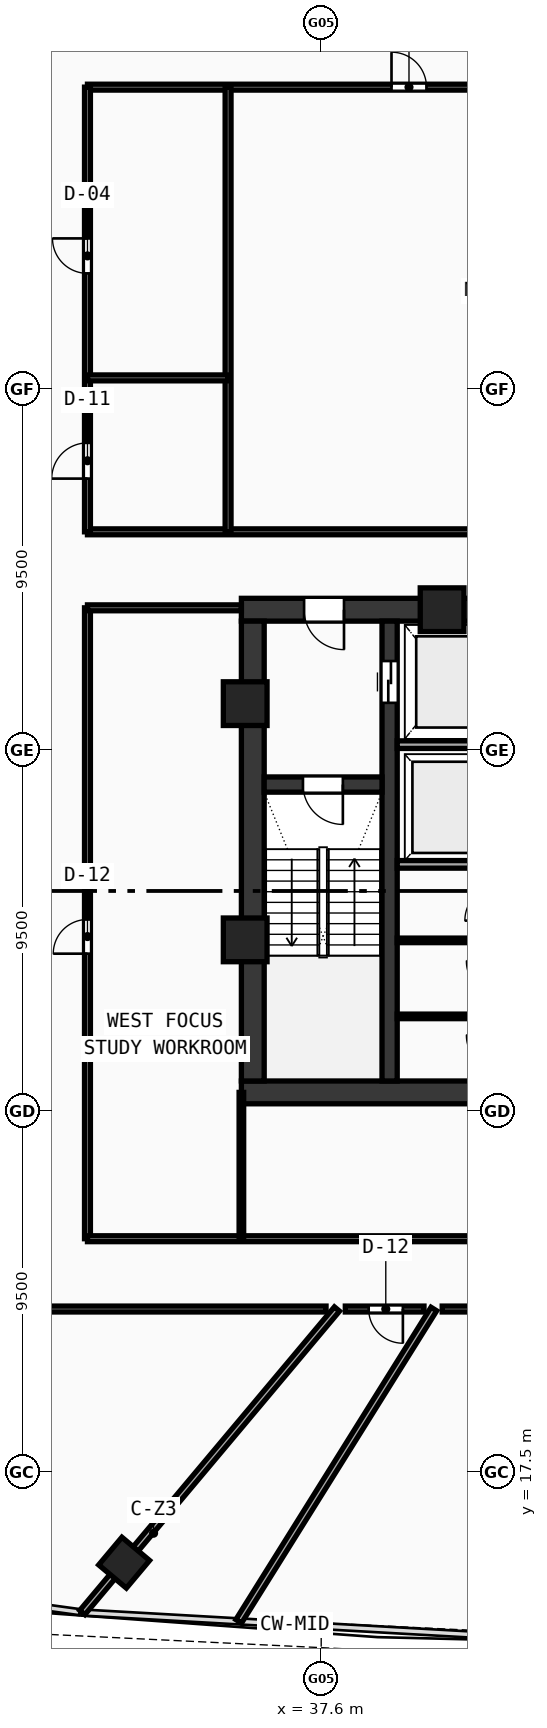
"""IFC4 building model, lengths in metres.
Left out: names, types, materials, properties, quantities, classifications, styles, units other than length and angle.
Written with IfcOpenShell. Run it as: python <this file> out.ifc"""

import sys

from ifc_helpers import new_model, si_unit, direction, frame, frame_2d, origin, origin_with_axes, origin_2d, place, context, subcontext, project, spatial, rectangle, hollow_rectangle, extrude, source, transform, mapped, element, fill, save


model = new_model("IFC4")
c1 = context("Model", 3, precision=1e-05, world=origin(), true_north=direction((0.0, 1.0)))
c2 = subcontext(c1, "Body", "Model", "MODEL_VIEW")
j1 = project(units=[si_unit("LENGTHUNIT", "METRE"), si_unit("PLANEANGLEUNIT", "RADIAN")], contexts=[c1])
p1 = place(None, origin())
s1 = spatial("IfcSite", under=j1, at=p1, CompositionType="ELEMENT")
p2 = place(p1, origin())
s2 = spatial("IfcBuilding", under=s1, at=p2, CompositionType="ELEMENT")
p3 = place(p2, frame((0.0, 0.0, 148.23)))
s3 = spatial("IfcBuildingStorey", under=s2, at=p3, CompositionType="ELEMENT", Elevation=148.23)
p4 = place(p3, frame((35.5, 27.5, 0.0), z_axis=(0.0, 0.0, 1.0), x_axis=(1.0, 0.0, 0.0)))
e1 = element("IfcWall", 1, at=p4, inside=s3, PredefinedType="SHEAR", context=c2, shape_type="SweptSolid", body=[
    extrude(rectangle(XDim=25.0, YDim=0.6, at=frame_2d((12.5, 0.0))), origin(), (0.0, 0.0, 1.0), 3.42),
])
p5 = place(p3, frame((35.5, 40.2, 0.0), z_axis=(0.0, 0.0, 1.0), x_axis=(1.0, 0.0, 0.0)))
e2 = element("IfcWall", 2, at=p5, inside=s3, PredefinedType="SHEAR", context=c2, shape_type="SweptSolid", body=[
    extrude(rectangle(XDim=11.3, YDim=0.6, at=frame_2d((5.65, 0.0))), origin(), (0.0, 0.0, 1.0), 3.42),
])
p6 = place(p5, frame((1.65, 0.0, 0.0)))
e3 = element("IfcOpeningElement", 3, at=p6, cuts=e2, PredefinedType="OPENING", context=c2, shape_type="SweptSolid", body=[
    extrude(rectangle(XDim=1.05, YDim=2.1, at=frame_2d((0.525, 1.05))), frame((0.0, 0.31, 0.0), z_axis=(0.0, -1.0, 0.0), x_axis=(1.0, 0.0, 0.0)), (0.0, 0.0, 1.0), 0.62),
])
p7 = place(p3, frame((35.8, 27.8, 0.0), z_axis=(0.0, 0.0, 1.0), x_axis=(0.0, 1.0, 0.0)))
e4 = element("IfcWall", 4, at=p7, inside=s3, PredefinedType="SHEAR", context=c2, shape_type="SweptSolid", body=[
    extrude(rectangle(XDim=12.1, YDim=0.6, at=frame_2d((6.05, 0.0))), origin(), (0.0, 0.0, 1.0), 3.42),
])
p8 = place(p3, frame((39.4, 27.8, 0.0), z_axis=(0.0, 0.0, 1.0), x_axis=(0.0, 1.0, 0.0)))
e5 = element("IfcWall", 5, at=p8, inside=s3, PredefinedType="SHEAR", context=c2, shape_type="SweptSolid", body=[
    extrude(rectangle(XDim=12.1, YDim=0.4, at=frame_2d((6.05, 0.0))), origin(), (0.0, 0.0, 1.0), 3.42),
])
p9 = place(p8, frame((9.95, 0.0, 0.0)))
e6 = element("IfcOpeningElement", 6, at=p9, cuts=e5, PredefinedType="OPENING", context=c2, shape_type="SweptSolid", body=[
    extrude(rectangle(XDim=1.1, YDim=2.1, at=frame_2d((0.55, 1.05))), frame((0.0, 0.21, 0.0), z_axis=(0.0, -1.0, 0.0), x_axis=(1.0, 0.0, 0.0)), (0.0, 0.0, 1.0), 0.42),
])
p10 = place(p3, frame((36.1, 35.6, 0.0), z_axis=(0.0, 0.0, 1.0), x_axis=(1.0, 0.0, 0.0)))
e7 = element("IfcWall", 7, at=p10, inside=s3, PredefinedType="SHEAR", context=c2, shape_type="SweptSolid", body=[
    extrude(rectangle(XDim=3.1, YDim=0.4, at=frame_2d((1.55, 0.0))), origin(), (0.0, 0.0, 1.0), 3.42),
])
p11 = place(p10, frame((1.02, 0.0, 0.0)))
e8 = element("IfcOpeningElement", 8, at=p11, cuts=e7, PredefinedType="OPENING", context=c2, shape_type="SweptSolid", body=[
    extrude(rectangle(XDim=1.05, YDim=2.1, at=frame_2d((0.525, 1.05))), frame((0.0, 0.21, 0.0), z_axis=(0.0, -1.0, 0.0), x_axis=(1.0, 0.0, 0.0)), (0.0, 0.0, 1.0), 0.42),
])
m1 = source(origin(), c2, "Body", "SweptSolid", [
    extrude(hollow_rectangle(XDim=1.15, YDim=1.15, WallThickness=0.048, at=origin_2d()), origin(), (0.0, 0.0, 1.0), 3.68),
])
for number, where, z_axis, x_axis in (
    (9, (40.781, 40.2, -0.26), (0.0, 0.0, 1.0), (1.0, 0.0, 0.0)),
    (10, (35.6, 37.729, -0.26), (0.0, 0.0, 1.0), (1.0, 0.0, 0.0)),
    (11, (35.6, 31.513, -0.26), (0.0, 0.0, 1.0), (1.0, 0.0, 0.0)),
):
    element("IfcColumn", number, at=place(p3, frame(where, z_axis=z_axis, x_axis=x_axis)), inside=s3, PredefinedType="COLUMN", context=c2, shape_type="MappedRepresentation", body=[
        mapped(m1, transform((0.0, 0.0, 0.0), scale=1.0)),
    ])
m2 = source(origin(), c2, "Body", "SweptSolid", [
    extrude(hollow_rectangle(XDim=0.95, YDim=0.95, WallThickness=0.04, at=origin_2d()), origin(), (0.0, 0.0, 1.0), 3.68),
])
p12 = place(p3, frame((32.415, 15.126, -0.26), z_axis=(0.0, 0.0, 1.0), x_axis=(0.766044443119, -0.642787609687, 0.0)))
e12 = element("IfcColumn", 12, at=p12, inside=s3, PredefinedType="COLUMN", context=c2, shape_type="MappedRepresentation", body=[
    mapped(m2, transform((0.0, 0.0, 0.0), scale=1.0)),
])
for number, where, z_axis, x_axis in (
    (13, (39.6, 36.65, 0.0), (0.0, 0.0, 1.0), (1.0, 0.0, 0.0)),
    (14, (39.6, 33.5, 0.0), (0.0, 0.0, 1.0), (1.0, 0.0, 0.0)),
):
    element("IfcWall", number, at=place(p3, frame(where, z_axis=z_axis, x_axis=x_axis)), inside=s3, PredefinedType="SOLIDWALL", context=c2, shape_type="SweptSolid", body=[
        extrude(rectangle(XDim=2.72, YDim=0.2, at=frame_2d((1.36, 0.0))), origin(), (0.0, 0.0, 1.0), 3.42),
    ])
for number, where, z_axis, x_axis in (
    (15, (39.6, 29.5, 0.0), (0.0, 0.0, 1.0), (1.0, 0.0, 0.0)),
    (16, (39.6, 31.5, 0.0), (0.0, 0.0, 1.0), (1.0, 0.0, 0.0)),
):
    element("IfcWall", number, at=place(p3, frame(where, z_axis=z_axis, x_axis=x_axis)), inside=s3, PredefinedType="PARTITIONING", context=c2, shape_type="SweptSolid", body=[
        extrude(rectangle(XDim=2.72, YDim=0.12, at=frame_2d((1.36, 0.0))), origin(), (0.0, 0.0, 1.0), 3.42),
    ])
p13 = place(p3, frame((31.45, 42.25, 0.0), z_axis=(0.0, 0.0, 1.0), x_axis=(1.0, 0.0, 0.0)))
e17 = element("IfcWall", 17, at=p13, inside=s3, PredefinedType="PARTITIONING", context=c2, shape_type="SweptSolid", body=[
    extrude(rectangle(XDim=33.1, YDim=0.155, at=frame_2d((16.55, 0.0))), origin(), (0.0, 0.0, 1.0), 2.77),
])
p14 = place(p3, frame((31.45, 53.95, 0.0), z_axis=(0.0, 0.0, 1.0), x_axis=(1.0, 0.0, 0.0)))
e18 = element("IfcWall", 18, at=p14, inside=s3, PredefinedType="PARTITIONING", context=c2, shape_type="SweptSolid", body=[
    extrude(rectangle(XDim=33.1, YDim=0.155, at=frame_2d((16.55, 0.0))), origin(), (0.0, 0.0, 1.0), 2.77),
])
p15 = place(p14, frame((8.0, 0.0, 0.0)))
e19 = element("IfcOpeningElement", 19, at=p15, cuts=e18, PredefinedType="OPENING", context=c2, shape_type="SweptSolid", body=[
    extrude(rectangle(XDim=0.92, YDim=2.1, at=frame_2d((0.46, 1.05))), frame((0.0, 0.087, 0.0), z_axis=(0.0, -1.0, 0.0), x_axis=(1.0, 0.0, 0.0)), (0.0, 0.0, 1.0), 0.175),
])
p16 = place(p14, frame((25.05, 0.0, 0.0)))
e20 = element("IfcOpeningElement", 20, at=p16, cuts=e18, PredefinedType="OPENING", context=c2, shape_type="SweptSolid", body=[
    extrude(rectangle(XDim=0.92, YDim=2.1, at=frame_2d((0.46, 1.05))), frame((0.0, 0.087, 0.0), z_axis=(0.0, -1.0, 0.0), x_axis=(1.0, 0.0, 0.0)), (0.0, 0.0, 1.0), 0.175),
])
p17 = place(p3, frame((31.45, 42.25, 0.0), z_axis=(0.0, 0.0, 1.0), x_axis=(0.0, 1.0, 0.0)))
e21 = element("IfcWall", 21, at=p17, inside=s3, PredefinedType="PARTITIONING", context=c2, shape_type="SweptSolid", body=[
    extrude(rectangle(XDim=11.7, YDim=0.155, at=frame_2d((5.85, 0.0))), origin(), (0.0, 0.0, 1.0), 2.77),
])
p18 = place(p17, frame((1.4, 0.0, 0.0)))
e22 = element("IfcOpeningElement", 22, at=p18, cuts=e21, PredefinedType="OPENING", context=c2, shape_type="SweptSolid", body=[
    extrude(rectangle(XDim=0.94, YDim=2.1, at=frame_2d((0.47, 1.05))), frame((0.0, 0.087, 0.0), z_axis=(0.0, -1.0, 0.0), x_axis=(1.0, 0.0, 0.0)), (0.0, 0.0, 1.0), 0.175),
])
p19 = place(p17, frame((6.8, 0.0, 0.0)))
e23 = element("IfcOpeningElement", 23, at=p19, cuts=e21, PredefinedType="OPENING", context=c2, shape_type="SweptSolid", body=[
    extrude(rectangle(XDim=0.92, YDim=2.1, at=frame_2d((0.46, 1.05))), frame((0.0, 0.087, 0.0), z_axis=(0.0, -1.0, 0.0), x_axis=(1.0, 0.0, 0.0)), (0.0, 0.0, 1.0), 0.175),
])
p20 = place(p3, frame((35.15, 42.25, 0.0), z_axis=(0.0, 0.0, 1.0), x_axis=(0.0, 1.0, 0.0)))
e24 = element("IfcWall", 24, at=p20, inside=s3, PredefinedType="PARTITIONING", context=c2, shape_type="SweptSolid", body=[
    extrude(rectangle(XDim=11.7, YDim=0.155, at=frame_2d((5.85, 0.0))), origin(), (0.0, 0.0, 1.0), 2.77),
])
p21 = place(p3, frame((31.45, 46.3, 0.0), z_axis=(0.0, 0.0, 1.0), x_axis=(1.0, 0.0, 0.0)))
e25 = element("IfcWall", 25, at=p21, inside=s3, PredefinedType="PARTITIONING", context=c2, shape_type="SweptSolid", body=[
    extrude(rectangle(XDim=3.7, YDim=0.155, at=frame_2d((1.85, 0.0))), origin(), (0.0, 0.0, 1.0), 2.77),
])
p22 = place(p3, frame((31.45, 23.65, 0.0), z_axis=(0.0, 0.0, 1.0), x_axis=(0.0, 1.0, 0.0)))
e26 = element("IfcWall", 26, at=p22, inside=s3, PredefinedType="PARTITIONING", context=c2, shape_type="SweptSolid", body=[
    extrude(rectangle(XDim=16.6, YDim=0.155, at=frame_2d((8.3, 0.0))), origin(), (0.0, 0.0, 1.0), 2.77),
])
p23 = place(p22, frame((7.5, 0.0, 0.0)))
e27 = element("IfcOpeningElement", 27, at=p23, cuts=e26, PredefinedType="OPENING", context=c2, shape_type="SweptSolid", body=[
    extrude(rectangle(XDim=0.9, YDim=2.08, at=frame_2d((0.45, 1.04))), frame((0.0, 0.087, 0.0), z_axis=(0.0, -1.0, 0.0), x_axis=(1.0, 0.0, 0.0)), (0.0, 0.0, 1.0), 0.175),
])
p24 = place(p3, frame((31.45, 23.65, 0.0), z_axis=(0.0, 0.0, 1.0), x_axis=(1.0, 0.0, 0.0)))
e28 = element("IfcWall", 28, at=p24, inside=s3, PredefinedType="PARTITIONING", context=c2, shape_type="SweptSolid", body=[
    extrude(rectangle(XDim=33.1, YDim=0.155, at=frame_2d((16.55, 0.0))), origin(), (0.0, 0.0, 1.0), 2.77),
])
p25 = place(p24, frame((16.0, 0.0, 0.0)))
e29 = element("IfcOpeningElement", 29, at=p25, cuts=e28, PredefinedType="OPENING", context=c2, shape_type="SweptSolid", body=[
    extrude(rectangle(XDim=0.92, YDim=2.1, at=frame_2d((0.46, 1.05))), frame((0.0, 0.087, 0.0), z_axis=(0.0, -1.0, 0.0), x_axis=(1.0, 0.0, 0.0)), (0.0, 0.0, 1.0), 0.175),
])
p26 = place(p3, frame((31.45, 40.25, 0.0), z_axis=(0.0, 0.0, 1.0), x_axis=(1.0, 0.0, 0.0)))
e30 = element("IfcWall", 30, at=p26, inside=s3, PredefinedType="PARTITIONING", context=c2, shape_type="SweptSolid", body=[
    extrude(rectangle(XDim=4.05, YDim=0.155, at=frame_2d((2.025, 0.0))), origin(), (0.0, 0.0, 1.0), 3.42),
])
p27 = place(p3, frame((35.5, 23.65, 0.0), z_axis=(0.0, 0.0, 1.0), x_axis=(0.0, 1.0, 0.0)))
e31 = element("IfcWall", 31, at=p27, inside=s3, PredefinedType="PARTITIONING", context=c2, shape_type="SweptSolid", body=[
    extrude(rectangle(XDim=3.85, YDim=0.12, at=frame_2d((1.925, 0.0))), origin(), (0.0, 0.0, 1.0), 3.02),
])
p28 = place(p3, frame((38.015, 21.8, 0.0), z_axis=(0.0, 0.0, 1.0), x_axis=(-0.642781677101, -0.76604942111, 0.0)))
e32 = element("IfcWall", 32, at=p28, inside=s3, PredefinedType="PARTITIONING", context=c2, shape_type="SweptSolid", body=[
    extrude(rectangle(XDim=10.424, YDim=0.175, at=frame_2d((5.212, 0.0))), origin(), (0.0, 0.0, 1.0), 2.77),
])
p29 = place(p3, frame((40.564, 21.8, 0.0), z_axis=(0.0, 0.0, 1.0), x_axis=(-0.529931002604, -0.848040761096, 0.0)))
e33 = element("IfcWall", 33, at=p29, inside=s3, PredefinedType="PARTITIONING", context=c2, shape_type="SweptSolid", body=[
    extrude(rectangle(XDim=9.691, YDim=0.175, at=frame_2d((4.845, 0.0))), origin(), (0.0, 0.0, 1.0), 2.77),
])
p30 = place(p3, frame((50.969, 21.8, 0.0), z_axis=(0.0, 0.0, 1.0), x_axis=(-1.0, 0.0, 0.0)))
e34 = element("IfcWall", 34, at=p30, inside=s3, PredefinedType="PARTITIONING", context=c2, shape_type="SweptSolid", body=[
    extrude(rectangle(XDim=10.185, YDim=0.155, at=frame_2d((5.092, 0.0))), origin(), (0.0, 0.0, 1.0), 2.77),
])
p31 = place(p30, frame((4.617, 0.0, 0.0)))
e35 = element("IfcOpeningElement", 35, at=p31, cuts=e34, PredefinedType="OPENING", context=c2, shape_type="SweptSolid", body=[
    extrude(rectangle(XDim=0.96, YDim=2.12, at=frame_2d((0.48, 1.06))), frame((0.0, 0.087, 0.0), z_axis=(0.0, -1.0, 0.0), x_axis=(1.0, 0.0, 0.0)), (0.0, 0.0, 1.0), 0.175),
])
p32 = place(p3, frame((40.305, 21.8, 0.0), z_axis=(0.0, 0.0, 1.0), x_axis=(-1.0, 0.0, 0.0)))
e36 = element("IfcWall", 36, at=p32, inside=s3, PredefinedType="PARTITIONING", context=c2, shape_type="SweptSolid", body=[
    extrude(rectangle(XDim=2.07, YDim=0.155, at=frame_2d((1.035, 0.0))), origin(), (0.0, 0.0, 1.0), 2.77),
])
p33 = place(p32, frame((0.555, 0.0, 0.0)))
e37 = element("IfcOpeningElement", 37, at=p33, cuts=e36, PredefinedType="OPENING", context=c2, shape_type="SweptSolid", body=[
    extrude(rectangle(XDim=0.9, YDim=2.08, at=frame_2d((0.45, 1.04))), frame((0.0, 0.087, 0.0), z_axis=(0.0, -1.0, 0.0), x_axis=(1.0, 0.0, 0.0)), (0.0, 0.0, 1.0), 0.175),
])
p34 = place(p3, frame((37.728, 21.8, 0.0), z_axis=(0.0, 0.0, 1.0), x_axis=(-1.0, 0.0, 0.0)))
e38 = element("IfcWall", 38, at=p34, inside=s3, PredefinedType="PARTITIONING", context=c2, shape_type="SweptSolid", body=[
    extrude(rectangle(XDim=8.127, YDim=0.155, at=frame_2d((4.064, 0.0))), origin(), (0.0, 0.0, 1.0), 3.02),
])
m3 = source(origin(), c2, "Body", "SweptSolid", [
    extrude(rectangle(XDim=1.05, YDim=2.1, at=frame_2d((0.525, 1.05))), frame((0.0, 0.025, 0.0), z_axis=(0.0, -1.0, 0.0), x_axis=(1.0, 0.0, 0.0)), (0.0, 0.0, 1.0), 0.05),
])
p35 = place(p11, frame((1.05, 0.0, 0.0), z_axis=(0.0, 0.0, 1.0), x_axis=(-1.0, 0.0, 0.0)))
e39 = element("IfcDoor", 39, at=p35, inside=s3, OperationType="SINGLE_SWING_LEFT", PredefinedType="DOOR", context=c2, shape_type="MappedRepresentation", body=[
    mapped(m3, transform((0.0, 0.0, 0.0), scale=1.0)),
])
fill(e8, e39)
p36 = place(p6, frame((1.05, 0.0, 0.0), z_axis=(0.0, 0.0, 1.0), x_axis=(-1.0, 0.0, 0.0)))
e40 = element("IfcDoor", 40, at=p36, inside=s3, OperationType="SINGLE_SWING_LEFT", PredefinedType="DOOR", context=c2, shape_type="MappedRepresentation", body=[
    mapped(m3, transform((0.0, 0.0, 0.0), scale=1.0)),
])
fill(e3, e40)
m4 = source(origin(), c2, "Body", "SweptSolid", [
    extrude(rectangle(XDim=1.1, YDim=2.1, at=frame_2d((0.55, 1.05))), frame((0.0, 0.025, 0.0), z_axis=(0.0, -1.0, 0.0), x_axis=(1.0, 0.0, 0.0)), (0.0, 0.0, 1.0), 0.05),
])
p37 = place(p9, frame((1.1, 0.0, 0.0), z_axis=(0.0, 0.0, 1.0), x_axis=(-1.0, 0.0, 0.0)))
e41 = element("IfcDoor", 41, at=p37, inside=s3, OperationType="DOUBLE_DOOR_SLIDING", PredefinedType="DOOR", context=c2, shape_type="MappedRepresentation", body=[
    mapped(m4, transform((0.0, 0.0, 0.0), scale=1.0)),
])
fill(e6, e41)
m5 = source(origin(), c2, "Body", "SweptSolid", [
    extrude(rectangle(XDim=0.94, YDim=2.1, at=frame_2d((0.47, 1.05))), frame((0.0, 0.025, 0.0), z_axis=(0.0, -1.0, 0.0), x_axis=(1.0, 0.0, 0.0)), (0.0, 0.0, 1.0), 0.05),
])
p38 = place(p18, origin_with_axes())
e42 = element("IfcDoor", 42, at=p38, inside=s3, OperationType="SINGLE_SWING_LEFT", PredefinedType="DOOR", context=c2, shape_type="MappedRepresentation", body=[
    mapped(m5, transform((0.0, 0.0, 0.0), scale=1.0)),
])
fill(e22, e42)
m6 = source(origin(), c2, "Body", "SweptSolid", [
    extrude(rectangle(XDim=0.92, YDim=2.1, at=frame_2d((0.46, 1.05))), frame((0.0, 0.025, 0.0), z_axis=(0.0, -1.0, 0.0), x_axis=(1.0, 0.0, 0.0)), (0.0, 0.0, 1.0), 0.05),
])
p39 = place(p19, origin_with_axes())
e43 = element("IfcDoor", 43, at=p39, inside=s3, OperationType="SINGLE_SWING_RIGHT", PredefinedType="DOOR", context=c2, shape_type="MappedRepresentation", body=[
    mapped(m6, transform((0.0, 0.0, 0.0), scale=1.0)),
])
fill(e23, e43)
p40 = place(p15, origin_with_axes())
e44 = element("IfcDoor", 44, at=p40, inside=s3, OperationType="SINGLE_SWING_LEFT", PredefinedType="DOOR", context=c2, shape_type="MappedRepresentation", body=[
    mapped(m6, transform((0.0, 0.0, 0.0), scale=1.0)),
])
fill(e19, e44)
m7 = source(origin(), c2, "Body", "SweptSolid", [
    extrude(rectangle(XDim=0.9, YDim=2.08, at=frame_2d((0.45, 1.04))), frame((0.0, 0.025, 0.0), z_axis=(0.0, -1.0, 0.0), x_axis=(1.0, 0.0, 0.0)), (0.0, 0.0, 1.0), 0.05),
])
p41 = place(p23, origin_with_axes())
e45 = element("IfcDoor", 45, at=p41, inside=s3, OperationType="SINGLE_SWING_LEFT", PredefinedType="DOOR", context=c2, shape_type="MappedRepresentation", body=[
    mapped(m7, transform((0.0, 0.0, 0.0), scale=1.0)),
])
fill(e27, e45)
p42 = place(p33, origin_with_axes())
e46 = element("IfcDoor", 46, at=p42, inside=s3, OperationType="SINGLE_SWING_LEFT", PredefinedType="DOOR", context=c2, shape_type="MappedRepresentation", body=[
    mapped(m7, transform((0.0, 0.0, 0.0), scale=1.0)),
])
fill(e37, e46)
save(model, sys.argv[1])
